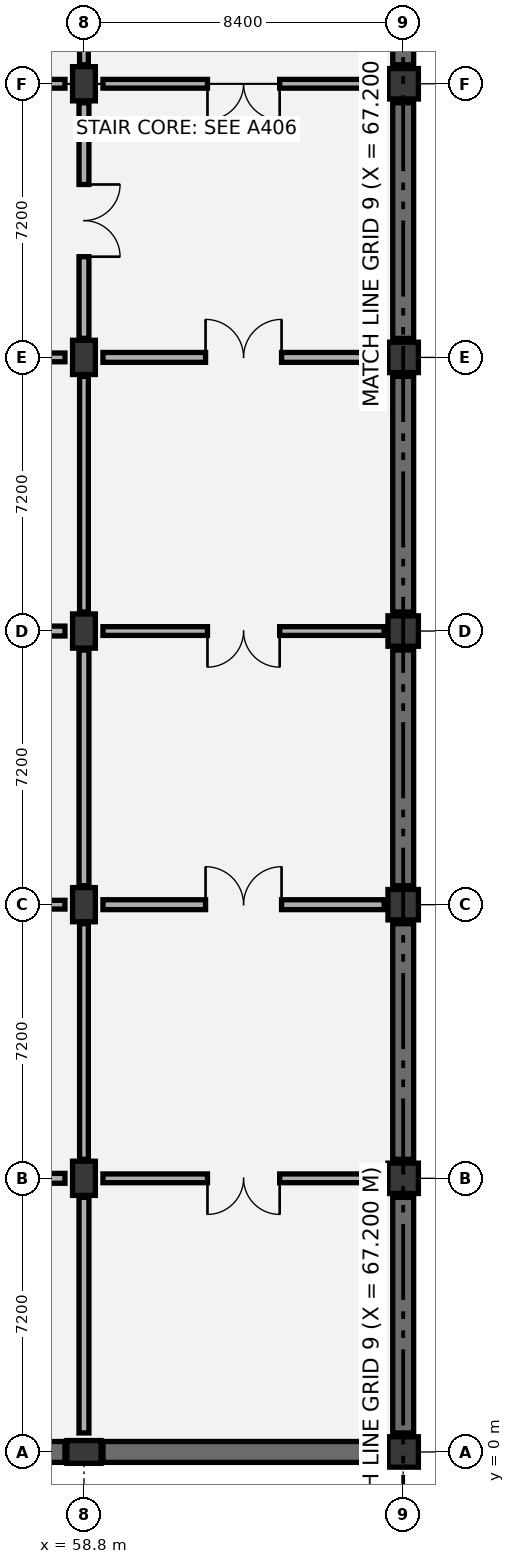
"""IFC4 building model, lengths in metres.
Left out: names, types, materials, properties, quantities, classifications, styles, units other than length and angle.
Written with IfcOpenShell. Run it as: python <this file> out.ifc"""

import sys

from ifc_helpers import new_model, si_unit, direction, frame, frame_2d, origin, origin_2d, place, context, subcontext, project, spatial, rectangle, extrude, element, fill, save


model = new_model("IFC4")
c1 = context("Model", 3, precision=1e-05, world=origin(), true_north=direction((0.0, 1.0)))
c2 = subcontext(c1, "Body", "Model", "MODEL_VIEW")
j1 = project(units=[si_unit("LENGTHUNIT", "METRE"), si_unit("PLANEANGLEUNIT", "RADIAN")], contexts=[c1])
p1 = place(None, origin())
s1 = spatial("IfcSite", under=j1, at=p1, CompositionType="ELEMENT")
p2 = place(p1, origin())
s2 = spatial("IfcBuilding", under=s1, at=p2, CompositionType="ELEMENT")
p3 = place(p2, frame((0.0, 0.0, -9.6)))
s3 = spatial("IfcBuildingStorey", under=s2, at=p3, CompositionType="ELEMENT", Elevation=-9.6)
for number, where, z_axis, x_axis in (
    (1, (58.8, 0.0, 0.0), (0.0, 0.0, 1.0), (0.0, 1.0, 0.0)),
    (2, (58.8, 7.2, 0.0), (0.0, 0.0, 1.0), (1.0, 0.0, 0.0)),
    (3, (58.8, 14.4, 0.0), (0.0, 0.0, 1.0), (1.0, 0.0, 0.0)),
    (4, (58.8, 21.6, 0.0), (0.0, 0.0, 1.0), (1.0, 0.0, 0.0)),
    (5, (58.8, 28.8, 0.0), (0.0, 0.0, 1.0), (1.0, 0.0, 0.0)),
    (6, (58.8, 36.0, 0.0), (0.0, 0.0, 1.0), (1.0, 0.0, 0.0)),
):
    element("IfcColumn", number, at=place(p3, frame(where, z_axis=z_axis, x_axis=x_axis)), inside=s3, PredefinedType="COLUMN", context=c2, shape_type="SweptSolid", body=[
        extrude(rectangle(XDim=0.6, YDim=0.9, at=origin_2d()), origin(), (0.0, 0.0, 1.0), 4.8),
    ])
for number, where, z_axis, x_axis in (
    (7, (67.2, 0.0, 0.0), (0.0, 0.0, 1.0), (1.0, 0.0, 0.0)),
    (8, (67.2, 7.2, 0.0), (0.0, 0.0, 1.0), (1.0, 0.0, 0.0)),
    (9, (67.2, 14.4, 0.0), (0.0, 0.0, 1.0), (1.0, 0.0, 0.0)),
    (10, (67.2, 21.6, 0.0), (0.0, 0.0, 1.0), (1.0, 0.0, 0.0)),
    (11, (67.2, 28.8, 0.0), (0.0, 0.0, 1.0), (1.0, 0.0, 0.0)),
    (12, (67.2, 36.0, 0.0), (0.0, 0.0, 1.0), (1.0, 0.0, 0.0)),
):
    element("IfcColumn", number, at=place(p3, frame(where, z_axis=z_axis, x_axis=x_axis)), inside=s3, PredefinedType="COLUMN", context=c2, shape_type="SweptSolid", body=[
        extrude(rectangle(XDim=0.8, YDim=0.8, at=origin_2d()), origin(), (0.0, 0.0, 1.0), 4.8),
    ])
p4 = place(p3, frame((50.9, 0.0, 0.0), z_axis=(0.0, 0.0, 1.0), x_axis=(1.0, 0.0, 0.0)))
e13 = element("IfcWall", 13, at=p4, inside=s3, PredefinedType="USERDEFINED", context=c2, shape_type="SweptSolid", body=[
    extrude(rectangle(XDim=7.4, YDim=0.55, at=frame_2d((3.7, 0.0))), origin(), (0.0, 0.0, 1.0), 4.4),
])
p5 = place(p3, frame((59.3, 0.0, 0.0), z_axis=(0.0, 0.0, 1.0), x_axis=(1.0, 0.0, 0.0)))
e14 = element("IfcWall", 14, at=p5, inside=s3, PredefinedType="USERDEFINED", context=c2, shape_type="SweptSolid", body=[
    extrude(rectangle(XDim=7.4, YDim=0.55, at=frame_2d((3.7, 0.0))), origin(), (0.0, 0.0, 1.0), 4.4),
])
for number, where, z_axis, x_axis in (
    (15, (67.2, 0.5, 0.0), (0.0, 0.0, 1.0), (0.0, 1.0, 0.0)),
    (16, (67.2, 7.7, 0.0), (0.0, 0.0, 1.0), (0.0, 1.0, 0.0)),
):
    element("IfcWall", number, at=place(p3, frame(where, z_axis=z_axis, x_axis=x_axis)), inside=s3, PredefinedType="USERDEFINED", context=c2, shape_type="SweptSolid", body=[
        extrude(rectangle(XDim=6.2, YDim=0.55, at=frame_2d((3.1, 0.0))), origin(), (0.0, 0.0, 1.0), 4.4),
    ])
p6 = place(p3, frame((67.2, 14.9, 0.0), z_axis=(0.0, 0.0, 1.0), x_axis=(0.0, 1.0, 0.0)))
e17 = element("IfcWall", 17, at=p6, inside=s3, PredefinedType="USERDEFINED", context=c2, shape_type="SweptSolid", body=[
    extrude(rectangle(XDim=6.2, YDim=0.55, at=frame_2d((3.1, 0.0))), origin(), (0.0, 0.0, 1.0), 4.4),
])
for number, where, z_axis, x_axis in (
    (18, (67.2, 22.1, 0.0), (0.0, 0.0, 1.0), (0.0, 1.0, 0.0)),
    (19, (67.2, 29.3, 0.0), (0.0, 0.0, 1.0), (0.0, 1.0, 0.0)),
    (20, (67.2, 36.5, 0.0), (0.0, 0.0, 1.0), (0.0, 1.0, 0.0)),
):
    element("IfcWall", number, at=place(p3, frame(where, z_axis=z_axis, x_axis=x_axis)), inside=s3, PredefinedType="USERDEFINED", context=c2, shape_type="SweptSolid", body=[
        extrude(rectangle(XDim=6.2, YDim=0.55, at=frame_2d((3.1, 0.0))), origin(), (0.0, 0.0, 1.0), 4.4),
    ])
p7 = place(p3, frame((58.8, 0.5, 0.0), z_axis=(0.0, 0.0, 1.0), x_axis=(0.0, 1.0, 0.0)))
e21 = element("IfcWall", 21, at=p7, inside=s3, PredefinedType="PARTITIONING", context=c2, shape_type="SweptSolid", body=[
    extrude(rectangle(XDim=6.2, YDim=0.26, at=frame_2d((3.1, 0.0))), origin(), (0.0, 0.0, 1.0), 3.595),
])
p8 = place(p3, frame((50.9, 7.2, 0.0), z_axis=(0.0, 0.0, 1.0), x_axis=(1.0, 0.0, 0.0)))
e22 = element("IfcWall", 22, at=p8, inside=s3, PredefinedType="PARTITIONING", context=c2, shape_type="SweptSolid", body=[
    extrude(rectangle(XDim=7.4, YDim=0.26, at=frame_2d((3.7, 0.0))), origin(), (0.0, 0.0, 1.0), 3.495),
])
p9 = place(p8, frame((2.75, 0.0, 0.0)))
e23 = element("IfcOpeningElement", 23, at=p9, cuts=e22, PredefinedType="OPENING", context=c2, shape_type="SweptSolid", body=[
    extrude(rectangle(XDim=1.9, YDim=2.3, at=frame_2d((0.95, 1.15))), frame((0.0, 0.14, 0.0), z_axis=(0.0, -1.0, 0.0), x_axis=(1.0, 0.0, 0.0)), (0.0, 0.0, 1.0), 0.28),
])
p10 = place(p3, frame((58.8, 7.7, 0.0), z_axis=(0.0, 0.0, 1.0), x_axis=(0.0, 1.0, 0.0)))
e24 = element("IfcWall", 24, at=p10, inside=s3, PredefinedType="PARTITIONING", context=c2, shape_type="SweptSolid", body=[
    extrude(rectangle(XDim=6.2, YDim=0.23, at=frame_2d((3.1, 0.0))), origin(), (0.0, 0.0, 1.0), 3.595),
])
p11 = place(p3, frame((50.9, 14.4, 0.0), z_axis=(0.0, 0.0, 1.0), x_axis=(1.0, 0.0, 0.0)))
e25 = element("IfcWall", 25, at=p11, inside=s3, PredefinedType="PARTITIONING", context=c2, shape_type="SweptSolid", body=[
    extrude(rectangle(XDim=7.4, YDim=0.23, at=frame_2d((3.7, 0.0))), origin(), (0.0, 0.0, 1.0), 3.495),
])
p12 = place(p11, frame((2.7, 0.0, 0.0)))
e26 = element("IfcOpeningElement", 26, at=p12, cuts=e25, PredefinedType="OPENING", context=c2, shape_type="SweptSolid", body=[
    extrude(rectangle(XDim=2.0, YDim=2.35, at=frame_2d((1.0, 1.175))), frame((0.0, 0.125, 0.0), z_axis=(0.0, -1.0, 0.0), x_axis=(1.0, 0.0, 0.0)), (0.0, 0.0, 1.0), 0.25),
])
p13 = place(p3, frame((58.8, 14.9, 0.0), z_axis=(0.0, 0.0, 1.0), x_axis=(0.0, 1.0, 0.0)))
e27 = element("IfcWall", 27, at=p13, inside=s3, PredefinedType="PARTITIONING", context=c2, shape_type="SweptSolid", body=[
    extrude(rectangle(XDim=6.2, YDim=0.26, at=frame_2d((3.1, 0.0))), origin(), (0.0, 0.0, 1.0), 3.595),
])
p14 = place(p3, frame((50.9, 21.6, 0.0), z_axis=(0.0, 0.0, 1.0), x_axis=(1.0, 0.0, 0.0)))
e28 = element("IfcWall", 28, at=p14, inside=s3, PredefinedType="PARTITIONING", context=c2, shape_type="SweptSolid", body=[
    extrude(rectangle(XDim=7.4, YDim=0.26, at=frame_2d((3.7, 0.0))), origin(), (0.0, 0.0, 1.0), 3.495),
])
p15 = place(p14, frame((2.75, 0.0, 0.0)))
e29 = element("IfcOpeningElement", 29, at=p15, cuts=e28, PredefinedType="OPENING", context=c2, shape_type="SweptSolid", body=[
    extrude(rectangle(XDim=1.9, YDim=2.3, at=frame_2d((0.95, 1.15))), frame((0.0, 0.14, 0.0), z_axis=(0.0, -1.0, 0.0), x_axis=(1.0, 0.0, 0.0)), (0.0, 0.0, 1.0), 0.28),
])
p16 = place(p3, frame((58.8, 22.1, 0.0), z_axis=(0.0, 0.0, 1.0), x_axis=(0.0, 1.0, 0.0)))
e30 = element("IfcWall", 30, at=p16, inside=s3, PredefinedType="PARTITIONING", context=c2, shape_type="SweptSolid", body=[
    extrude(rectangle(XDim=6.2, YDim=0.23, at=frame_2d((3.1, 0.0))), origin(), (0.0, 0.0, 1.0), 3.595),
])
p17 = place(p3, frame((50.9, 28.8, 0.0), z_axis=(0.0, 0.0, 1.0), x_axis=(1.0, 0.0, 0.0)))
e31 = element("IfcWall", 31, at=p17, inside=s3, PredefinedType="PARTITIONING", context=c2, shape_type="SweptSolid", body=[
    extrude(rectangle(XDim=7.4, YDim=0.23, at=frame_2d((3.7, 0.0))), origin(), (0.0, 0.0, 1.0), 3.495),
])
p18 = place(p17, frame((2.7, 0.0, 0.0)))
e32 = element("IfcOpeningElement", 32, at=p18, cuts=e31, PredefinedType="OPENING", context=c2, shape_type="SweptSolid", body=[
    extrude(rectangle(XDim=2.0, YDim=2.35, at=frame_2d((1.0, 1.175))), frame((0.0, 0.125, 0.0), z_axis=(0.0, -1.0, 0.0), x_axis=(1.0, 0.0, 0.0)), (0.0, 0.0, 1.0), 0.25),
])
p19 = place(p3, frame((58.8, 29.3, 0.0), z_axis=(0.0, 0.0, 1.0), x_axis=(0.0, 1.0, 0.0)))
e33 = element("IfcWall", 33, at=p19, inside=s3, PredefinedType="PARTITIONING", context=c2, shape_type="SweptSolid", body=[
    extrude(rectangle(XDim=6.2, YDim=0.26, at=frame_2d((3.1, 0.0))), origin(), (0.0, 0.0, 1.0), 3.595),
])
p20 = place(p19, frame((2.15, 0.0, 0.0)))
e34 = element("IfcOpeningElement", 34, at=p20, cuts=e33, PredefinedType="OPENING", context=c2, shape_type="SweptSolid", body=[
    extrude(rectangle(XDim=1.9, YDim=2.3, at=frame_2d((0.95, 1.15))), frame((0.0, 0.14, 0.0), z_axis=(0.0, -1.0, 0.0), x_axis=(1.0, 0.0, 0.0)), (0.0, 0.0, 1.0), 0.28),
])
p21 = place(p3, frame((50.9, 36.0, 0.0), z_axis=(0.0, 0.0, 1.0), x_axis=(1.0, 0.0, 0.0)))
e35 = element("IfcWall", 35, at=p21, inside=s3, PredefinedType="PARTITIONING", context=c2, shape_type="SweptSolid", body=[
    extrude(rectangle(XDim=7.4, YDim=0.23, at=frame_2d((3.7, 0.0))), origin(), (0.0, 0.0, 1.0), 3.495),
])
p22 = place(p21, frame((2.95, 0.0, 0.0)))
e36 = element("IfcOpeningElement", 36, at=p22, cuts=e35, PredefinedType="OPENING", context=c2, shape_type="SweptSolid", body=[
    extrude(rectangle(XDim=1.5, YDim=2.15, at=frame_2d((0.75, 1.075))), frame((0.0, 0.125, 0.0), z_axis=(0.0, -1.0, 0.0), x_axis=(1.0, 0.0, 0.0)), (0.0, 0.0, 1.0), 0.25),
])
p23 = place(p3, frame((58.8, 36.5, 0.0), z_axis=(0.0, 0.0, 1.0), x_axis=(0.0, 1.0, 0.0)))
e37 = element("IfcWall", 37, at=p23, inside=s3, PredefinedType="PARTITIONING", context=c2, shape_type="SweptSolid", body=[
    extrude(rectangle(XDim=6.2, YDim=0.23, at=frame_2d((3.1, 0.0))), origin(), (0.0, 0.0, 1.0), 3.595),
])
p24 = place(p3, frame((59.3, 7.2, 0.0), z_axis=(0.0, 0.0, 1.0), x_axis=(1.0, 0.0, 0.0)))
e38 = element("IfcWall", 38, at=p24, inside=s3, PredefinedType="PARTITIONING", context=c2, shape_type="SweptSolid", body=[
    extrude(rectangle(XDim=7.4, YDim=0.23, at=frame_2d((3.7, 0.0))), origin(), (0.0, 0.0, 1.0), 3.495),
])
p25 = place(p24, frame((2.75, 0.0, 0.0)))
e39 = element("IfcOpeningElement", 39, at=p25, cuts=e38, PredefinedType="OPENING", context=c2, shape_type="SweptSolid", body=[
    extrude(rectangle(XDim=1.9, YDim=2.3, at=frame_2d((0.95, 1.15))), frame((0.0, 0.125, 0.0), z_axis=(0.0, -1.0, 0.0), x_axis=(1.0, 0.0, 0.0)), (0.0, 0.0, 1.0), 0.25),
])
p26 = place(p3, frame((59.3, 14.4, 0.0), z_axis=(0.0, 0.0, 1.0), x_axis=(1.0, 0.0, 0.0)))
e40 = element("IfcWall", 40, at=p26, inside=s3, PredefinedType="PARTITIONING", context=c2, shape_type="SweptSolid", body=[
    extrude(rectangle(XDim=7.4, YDim=0.26, at=frame_2d((3.7, 0.0))), origin(), (0.0, 0.0, 1.0), 3.495),
])
p27 = place(p26, frame((2.7, 0.0, 0.0)))
e41 = element("IfcOpeningElement", 41, at=p27, cuts=e40, PredefinedType="OPENING", context=c2, shape_type="SweptSolid", body=[
    extrude(rectangle(XDim=2.0, YDim=2.35, at=frame_2d((1.0, 1.175))), frame((0.0, 0.14, 0.0), z_axis=(0.0, -1.0, 0.0), x_axis=(1.0, 0.0, 0.0)), (0.0, 0.0, 1.0), 0.28),
])
p28 = place(p3, frame((59.3, 21.6, 0.0), z_axis=(0.0, 0.0, 1.0), x_axis=(1.0, 0.0, 0.0)))
e42 = element("IfcWall", 42, at=p28, inside=s3, PredefinedType="PARTITIONING", context=c2, shape_type="SweptSolid", body=[
    extrude(rectangle(XDim=7.4, YDim=0.23, at=frame_2d((3.7, 0.0))), origin(), (0.0, 0.0, 1.0), 3.495),
])
p29 = place(p28, frame((2.75, 0.0, 0.0)))
e43 = element("IfcOpeningElement", 43, at=p29, cuts=e42, PredefinedType="OPENING", context=c2, shape_type="SweptSolid", body=[
    extrude(rectangle(XDim=1.9, YDim=2.3, at=frame_2d((0.95, 1.15))), frame((0.0, 0.125, 0.0), z_axis=(0.0, -1.0, 0.0), x_axis=(1.0, 0.0, 0.0)), (0.0, 0.0, 1.0), 0.25),
])
p30 = place(p3, frame((59.3, 28.8, 0.0), z_axis=(0.0, 0.0, 1.0), x_axis=(1.0, 0.0, 0.0)))
e44 = element("IfcWall", 44, at=p30, inside=s3, PredefinedType="PARTITIONING", context=c2, shape_type="SweptSolid", body=[
    extrude(rectangle(XDim=7.4, YDim=0.26, at=frame_2d((3.7, 0.0))), origin(), (0.0, 0.0, 1.0), 3.495),
])
p31 = place(p30, frame((2.7, 0.0, 0.0)))
e45 = element("IfcOpeningElement", 45, at=p31, cuts=e44, PredefinedType="OPENING", context=c2, shape_type="SweptSolid", body=[
    extrude(rectangle(XDim=2.0, YDim=2.35, at=frame_2d((1.0, 1.175))), frame((0.0, 0.14, 0.0), z_axis=(0.0, -1.0, 0.0), x_axis=(1.0, 0.0, 0.0)), (0.0, 0.0, 1.0), 0.28),
])
p32 = place(p3, frame((59.3, 36.0, 0.0), z_axis=(0.0, 0.0, 1.0), x_axis=(1.0, 0.0, 0.0)))
e46 = element("IfcWall", 46, at=p32, inside=s3, PredefinedType="PARTITIONING", context=c2, shape_type="SweptSolid", body=[
    extrude(rectangle(XDim=7.4, YDim=0.23, at=frame_2d((3.7, 0.0))), origin(), (0.0, 0.0, 1.0), 3.495),
])
p33 = place(p32, frame((2.75, 0.0, 0.0)))
e47 = element("IfcOpeningElement", 47, at=p33, cuts=e46, PredefinedType="OPENING", context=c2, shape_type="SweptSolid", body=[
    extrude(rectangle(XDim=1.9, YDim=2.3, at=frame_2d((0.95, 1.15))), frame((0.0, 0.125, 0.0), z_axis=(0.0, -1.0, 0.0), x_axis=(1.0, 0.0, 0.0)), (0.0, 0.0, 1.0), 0.25),
])
p34 = place(p20, frame((1.9, 0.0, 0.0), z_axis=(0.0, 0.0, 1.0), x_axis=(-1.0, 0.0, 0.0)))
e48 = element("IfcDoor", 48, at=p34, inside=s3, OperationType="DOUBLE_DOOR_SINGLE_SWING", PredefinedType="DOOR", context=c2, shape_type="SweptSolid", body=[
    extrude(rectangle(XDim=1.9, YDim=2.3, at=frame_2d((0.95, 1.15))), frame((0.0, 0.025, 0.0), z_axis=(0.0, -1.0, 0.0), x_axis=(1.0, 0.0, 0.0)), (0.0, 0.0, 1.0), 0.05),
])
fill(e34, e48)
p35 = place(p25, frame((1.9, 0.0, 0.0), z_axis=(0.0, 0.0, 1.0), x_axis=(-1.0, 0.0, 0.0)))
e49 = element("IfcDoor", 49, at=p35, inside=s3, OperationType="DOUBLE_DOOR_SINGLE_SWING", PredefinedType="DOOR", context=c2, shape_type="SweptSolid", body=[
    extrude(rectangle(XDim=1.9, YDim=2.3, at=frame_2d((0.95, 1.15))), frame((0.0, 0.025, 0.0), z_axis=(0.0, -1.0, 0.0), x_axis=(1.0, 0.0, 0.0)), (0.0, 0.0, 1.0), 0.05),
])
fill(e39, e49)
p36 = place(p27, origin())
e50 = element("IfcDoor", 50, at=p36, inside=s3, OperationType="DOUBLE_DOOR_SINGLE_SWING", PredefinedType="DOOR", context=c2, shape_type="SweptSolid", body=[
    extrude(rectangle(XDim=2.0, YDim=2.35, at=frame_2d((1.0, 1.175))), frame((0.0, 0.025, 0.0), z_axis=(0.0, -1.0, 0.0), x_axis=(1.0, 0.0, 0.0)), (0.0, 0.0, 1.0), 0.05),
])
fill(e41, e50)
p37 = place(p29, frame((1.9, 0.0, 0.0), z_axis=(0.0, 0.0, 1.0), x_axis=(-1.0, 0.0, 0.0)))
e51 = element("IfcDoor", 51, at=p37, inside=s3, OperationType="DOUBLE_DOOR_SINGLE_SWING", PredefinedType="DOOR", context=c2, shape_type="SweptSolid", body=[
    extrude(rectangle(XDim=1.9, YDim=2.3, at=frame_2d((0.95, 1.15))), frame((0.0, 0.025, 0.0), z_axis=(0.0, -1.0, 0.0), x_axis=(1.0, 0.0, 0.0)), (0.0, 0.0, 1.0), 0.05),
])
fill(e43, e51)
p38 = place(p31, origin())
e52 = element("IfcDoor", 52, at=p38, inside=s3, OperationType="DOUBLE_DOOR_SINGLE_SWING", PredefinedType="DOOR", context=c2, shape_type="SweptSolid", body=[
    extrude(rectangle(XDim=2.0, YDim=2.35, at=frame_2d((1.0, 1.175))), frame((0.0, 0.025, 0.0), z_axis=(0.0, -1.0, 0.0), x_axis=(1.0, 0.0, 0.0)), (0.0, 0.0, 1.0), 0.05),
])
fill(e45, e52)
p39 = place(p33, frame((1.9, 0.0, 0.0), z_axis=(0.0, 0.0, 1.0), x_axis=(-1.0, 0.0, 0.0)))
e53 = element("IfcDoor", 53, at=p39, inside=s3, OperationType="DOUBLE_DOOR_SINGLE_SWING", PredefinedType="DOOR", context=c2, shape_type="SweptSolid", body=[
    extrude(rectangle(XDim=1.9, YDim=2.3, at=frame_2d((0.95, 1.15))), frame((0.0, 0.025, 0.0), z_axis=(0.0, -1.0, 0.0), x_axis=(1.0, 0.0, 0.0)), (0.0, 0.0, 1.0), 0.05),
])
fill(e47, e53)
save(model, sys.argv[1])
